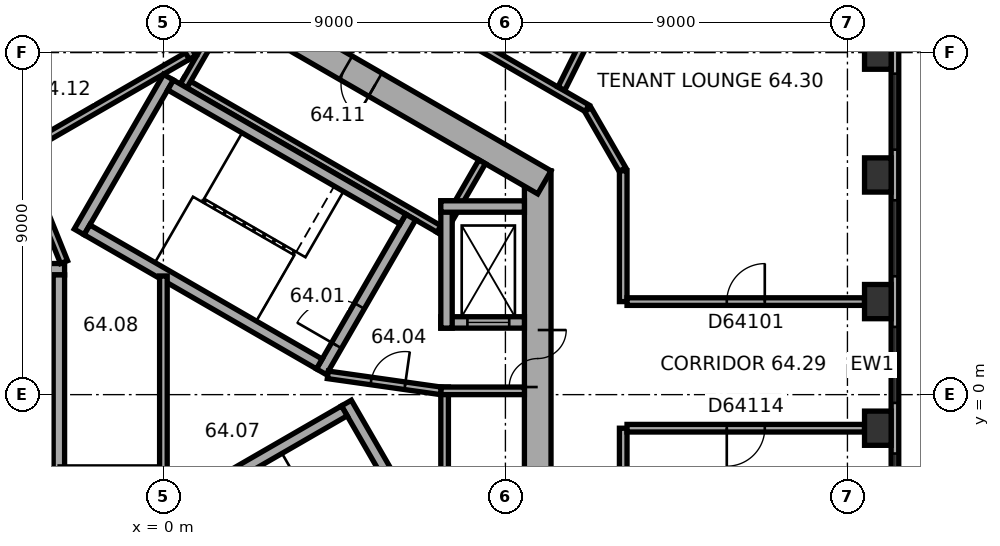
"""IFC4 building model, lengths in metres.
Left out: names, types, materials, properties, quantities, classifications, styles, units other than length and angle.
Written with IfcOpenShell. Run it as: python <this file> out.ifc"""

import sys

from ifc_helpers import new_model, si_unit, direction, frame, frame_2d, origin, origin_2d, place, context, subcontext, project, spatial, rectangle, extrude, element, fill, save


model = new_model("IFC4")
c1 = context("Model", 3, precision=1e-05, world=origin(), true_north=direction((0.0, 1.0)))
c2 = subcontext(c1, "Body", "Model", "MODEL_VIEW")
j1 = project(units=[si_unit("LENGTHUNIT", "METRE"), si_unit("PLANEANGLEUNIT", "RADIAN")], contexts=[c1])
p1 = place(None, origin())
s1 = spatial("IfcSite", under=j1, at=p1, CompositionType="ELEMENT")
p2 = place(p1, origin())
s2 = spatial("IfcBuilding", under=s1, at=p2, CompositionType="ELEMENT")
p3 = place(p2, frame((0.0, 0.0, 259.8)))
s3 = spatial("IfcBuildingStorey", under=s2, at=p3, CompositionType="ELEMENT", Elevation=259.8)
for number, where, z_axis, x_axis in (
    (1, (18.8, -0.883, 0.0), (0.0, 0.0, 1.0), (0.0, 1.0, 0.0)),
    (2, (18.8, 2.448, 0.0), (0.0, 0.0, 1.0), (0.0, 1.0, 0.0)),
    (3, (18.8, 5.78, 0.0), (0.0, 0.0, 1.0), (0.0, 1.0, 0.0)),
):
    element("IfcColumn", number, at=place(p3, frame(where, z_axis=z_axis, x_axis=x_axis)), inside=s3, PredefinedType="COLUMN", context=c2, shape_type="SweptSolid", body=[
        extrude(rectangle(XDim=0.9, YDim=0.7, at=origin_2d()), origin(), (0.0, 0.0, 1.0), 3.7),
    ])
p4 = place(p3, frame((18.8, 9.112, 0.0), z_axis=(0.0, 0.0, 1.0), x_axis=(0.0, 1.0, 0.0)))
e4 = element("IfcColumn", 4, at=p4, inside=s3, PredefinedType="COLUMN", context=c2, shape_type="SweptSolid", body=[
    extrude(rectangle(XDim=1.1, YDim=0.7, at=origin_2d()), origin(), (0.0, 0.0, 1.0), 3.7),
])
p5 = place(p3, frame((9.85, -5.889, 0.0), z_axis=(0.0, 0.0, 1.0), x_axis=(0.0, 1.0, 0.0)))
e5 = element("IfcWall", 5, at=p5, inside=s3, PredefinedType="SHEAR", context=c2, shape_type="SweptSolid", body=[
    extrude(rectangle(XDim=11.778, YDim=0.7, at=frame_2d((5.889, 0.0))), origin(), (0.0, 0.0, 1.0), 3.7),
])
p6 = place(p5, frame((6.089, 0.0, 0.0)))
e6 = element("IfcOpeningElement", 6, at=p6, cuts=e5, PredefinedType="OPENING", context=c2, shape_type="SweptSolid", body=[
    extrude(rectangle(XDim=1.5, YDim=2.1, at=frame_2d((0.75, 1.05))), frame((0.0, 0.36, 0.0), z_axis=(0.0, -1.0, 0.0), x_axis=(1.0, 0.0, 0.0)), (0.0, 0.0, 1.0), 0.72),
])
p7 = place(p5, frame((2.939, 0.0, 0.0)))
e7 = element("IfcOpeningElement", 7, at=p7, cuts=e5, PredefinedType="OPENING", context=c2, shape_type="SweptSolid", body=[
    extrude(rectangle(XDim=0.9, YDim=2.1, at=frame_2d((0.45, 1.05))), frame((0.0, 0.36, 0.0), z_axis=(0.0, -1.0, 0.0), x_axis=(1.0, 0.0, 0.0)), (0.0, 0.0, 1.0), 0.72),
])
p8 = place(p3, frame((10.025, 5.586, 0.0), z_axis=(0.0, 0.0, 1.0), x_axis=(-0.866026453023, 0.499998182661, 0.0)))
e8 = element("IfcWall", 8, at=p8, inside=s3, PredefinedType="SHEAR", context=c2, shape_type="SweptSolid", body=[
    extrude(rectangle(XDim=11.778, YDim=0.7, at=frame_2d((5.889, 0.0))), origin(), (0.0, 0.0, 1.0), 3.7),
])
p9 = place(p8, frame((5.139, 0.0, 0.0)))
e9 = element("IfcOpeningElement", 9, at=p9, cuts=e8, PredefinedType="OPENING", context=c2, shape_type="SweptSolid", body=[
    extrude(rectangle(XDim=0.9, YDim=2.1, at=frame_2d((0.45, 1.05))), frame((0.0, 0.36, 0.0), z_axis=(0.0, -1.0, 0.0), x_axis=(1.0, 0.0, 0.0)), (0.0, 0.0, 1.0), 0.72),
])
p10 = place(p3, frame((0.175, 11.475, 0.0), z_axis=(0.0, 0.0, 1.0), x_axis=(-0.866026453023, -0.499998182661, 0.0)))
e10 = element("IfcWall", 10, at=p10, inside=s3, PredefinedType="SHEAR", context=c2, shape_type="SweptSolid", body=[
    extrude(rectangle(XDim=11.778, YDim=0.7, at=frame_2d((5.889, 0.0))), origin(), (0.0, 0.0, 1.0), 3.7),
])
p11 = place(p10, frame((6.089, 0.0, 0.0)))
e11 = element("IfcOpeningElement", 11, at=p11, cuts=e10, PredefinedType="OPENING", context=c2, shape_type="SweptSolid", body=[
    extrude(rectangle(XDim=1.5, YDim=2.1, at=frame_2d((0.75, 1.05))), frame((0.0, 0.36, 0.0), z_axis=(0.0, -1.0, 0.0), x_axis=(1.0, 0.0, 0.0)), (0.0, 0.0, 1.0), 0.72),
])
p12 = place(p10, frame((2.939, 0.0, 0.0)))
e12 = element("IfcOpeningElement", 12, at=p12, cuts=e10, PredefinedType="OPENING", context=c2, shape_type="SweptSolid", body=[
    extrude(rectangle(XDim=0.9, YDim=2.1, at=frame_2d((0.45, 1.05))), frame((0.0, 0.36, 0.0), z_axis=(0.0, -1.0, 0.0), x_axis=(1.0, 0.0, 0.0)), (0.0, 0.0, 1.0), 0.72),
])
p13 = place(p3, frame((19.25, -8.084, 0.0), z_axis=(0.0, 0.0, 1.0), x_axis=(0.0, 1.0, 0.0)))
e13 = element("IfcWall", 13, at=p13, inside=s3, PredefinedType="STANDARD", context=c2, shape_type="SweptSolid", body=[
    extrude(rectangle(XDim=17.731, YDim=0.2, at=frame_2d((8.866, 0.0))), origin(), (0.0, 0.0, 1.0), 3.7),
])
p14 = place(p13, frame((1.203, 0.0, 0.9)))
e14 = element("IfcOpeningElement", 14, at=p14, cuts=e13, PredefinedType="OPENING", context=c2, shape_type="SweptSolid", body=[
    extrude(rectangle(XDim=2.0, YDim=2.0, at=frame_2d((1.0, 1.0))), frame((0.0, 0.11, 0.0), z_axis=(0.0, -1.0, 0.0), x_axis=(1.0, 0.0, 0.0)), (0.0, 0.0, 1.0), 0.22),
])
p15 = place(p13, frame((4.535, 0.0, 0.9)))
e15 = element("IfcOpeningElement", 15, at=p15, cuts=e13, PredefinedType="OPENING", context=c2, shape_type="SweptSolid", body=[
    extrude(rectangle(XDim=2.0, YDim=2.0, at=frame_2d((1.0, 1.0))), frame((0.0, 0.11, 0.0), z_axis=(0.0, -1.0, 0.0), x_axis=(1.0, 0.0, 0.0)), (0.0, 0.0, 1.0), 0.22),
])
p16 = place(p13, frame((7.866, 0.0, 0.9)))
e16 = element("IfcOpeningElement", 16, at=p16, cuts=e13, PredefinedType="OPENING", context=c2, shape_type="SweptSolid", body=[
    extrude(rectangle(XDim=2.0, YDim=2.0, at=frame_2d((1.0, 1.0))), frame((0.0, 0.11, 0.0), z_axis=(0.0, -1.0, 0.0), x_axis=(1.0, 0.0, 0.0)), (0.0, 0.0, 1.0), 0.22),
])
p17 = place(p13, frame((11.198, 0.0, 0.9)))
e17 = element("IfcOpeningElement", 17, at=p17, cuts=e13, PredefinedType="OPENING", context=c2, shape_type="SweptSolid", body=[
    extrude(rectangle(XDim=2.0, YDim=2.0, at=frame_2d((1.0, 1.0))), frame((0.0, 0.11, 0.0), z_axis=(0.0, -1.0, 0.0), x_axis=(1.0, 0.0, 0.0)), (0.0, 0.0, 1.0), 0.22),
])
p18 = place(p13, frame((14.53, 0.0, 0.9)))
e18 = element("IfcOpeningElement", 18, at=p18, cuts=e13, PredefinedType="OPENING", context=c2, shape_type="SweptSolid", body=[
    extrude(rectangle(XDim=2.0, YDim=2.0, at=frame_2d((1.0, 1.0))), frame((0.0, 0.11, 0.0), z_axis=(0.0, -1.0, 0.0), x_axis=(1.0, 0.0, 0.0)), (0.0, 0.0, 1.0), 0.22),
])
p19 = place(p3, frame((7.4, -5.2, 0.0), z_axis=(0.0, 0.0, 1.0), x_axis=(0.0, 1.0, 0.0)))
e19 = element("IfcWall", 19, at=p19, inside=s3, PredefinedType="PARTITIONING", context=c2, shape_type="SweptSolid", body=[
    extrude(rectangle(XDim=5.4, YDim=0.2, at=frame_2d((2.7, 0.0))), origin(), (0.0, 0.0, 1.0), 3.42),
])
p20 = place(p3, frame((7.3, 0.1, 0.0), z_axis=(0.0, 0.0, 1.0), x_axis=(1.0, 0.0, 0.0)))
e20 = element("IfcWall", 20, at=p20, inside=s3, PredefinedType="PARTITIONING", context=c2, shape_type="SweptSolid", body=[
    extrude(rectangle(XDim=2.2, YDim=0.2, at=frame_2d((1.1, 0.0))), origin(), (0.0, 0.0, 1.0), 3.42),
])
p21 = place(p3, frame((7.424, 4.259, 0.0), z_axis=(0.0, 0.0, 1.0), x_axis=(-0.866026010844, 0.49999894854, 0.0)))
e21 = element("IfcWall", 21, at=p21, inside=s3, PredefinedType="PARTITIONING", context=c2, shape_type="SweptSolid", body=[
    extrude(rectangle(XDim=8.0, YDim=0.2, at=frame_2d((4.0, 0.0))), origin(), (0.0, 0.0, 1.0), 3.42),
])
for number, where, z_axis, x_axis in (
    (22, (7.287, 4.222, 0.0), (0.0, 0.0, 1.0), (0.5, 0.866, 0.0)),
    (23, (0.532, 8.122, 0.0), (0.0, 0.0, 1.0), (0.5, 0.866, 0.0)),
):
    element("IfcWall", number, at=place(p3, frame(where, z_axis=z_axis, x_axis=x_axis)), inside=s3, PredefinedType="PARTITIONING", context=c2, shape_type="SweptSolid", body=[
        extrude(rectangle(XDim=2.2, YDim=0.2, at=frame_2d((1.1, 0.0))), origin(), (0.0, 0.0, 1.0), 3.42),
    ])
p22 = place(p3, frame((0.803, 9.009, 0.0), z_axis=(0.0, 0.0, 1.0), x_axis=(-0.866028230842, -0.499995103361, 0.0)))
e24 = element("IfcWall", 24, at=p22, inside=s3, PredefinedType="PARTITIONING", context=c2, shape_type="SweptSolid", body=[
    extrude(rectangle(XDim=5.4, YDim=0.2, at=frame_2d((2.7, 0.0))), origin(), (0.0, 0.0, 1.0), 3.42),
])
p23 = place(p3, frame((0.767, 8.872, 0.0), z_axis=(0.0, 0.0, 1.0), x_axis=(-0.499994660107, 0.866028486751, 0.0)))
e25 = element("IfcWall", 25, at=p23, inside=s3, PredefinedType="PARTITIONING", context=c2, shape_type="SweptSolid", body=[
    extrude(rectangle(XDim=2.2, YDim=0.2, at=frame_2d((1.1, 0.0))), origin(), (0.0, 0.0, 1.0), 3.42),
])
p24 = place(p3, frame((4.158, 0.602, 0.0), z_axis=(0.0, 0.0, 1.0), x_axis=(0.499977259774, 0.866038532462, 0.0)))
e26 = element("IfcWall", 26, at=p24, inside=s3, PredefinedType="SHEAR", context=c2, shape_type="SweptSolid", body=[
    extrude(rectangle(XDim=4.7, YDim=0.3, at=frame_2d((2.35, 0.0))), origin(), (0.0, 0.0, 1.0), 3.42),
])
p25 = place(p24, frame((0.8, 0.0, 0.0)))
e27 = element("IfcOpeningElement", 27, at=p25, cuts=e26, PredefinedType="OPENING", context=c2, shape_type="SweptSolid", body=[
    extrude(rectangle(XDim=1.2, YDim=2.1, at=frame_2d((0.6, 1.05))), frame((0.0, 0.16, 0.0), z_axis=(0.0, -1.0, 0.0), x_axis=(1.0, 0.0, 0.0)), (0.0, 0.0, 1.0), 0.32),
])
p26 = place(p3, frame((-2.216, 4.282, 0.0), z_axis=(0.0, 0.0, 1.0), x_axis=(0.499977259774, 0.866038532462, 0.0)))
e28 = element("IfcWall", 28, at=p26, inside=s3, PredefinedType="SHEAR", context=c2, shape_type="SweptSolid", body=[
    extrude(rectangle(XDim=4.7, YDim=0.3, at=frame_2d((2.35, 0.0))), origin(), (0.0, 0.0, 1.0), 3.42),
])
for number, where, z_axis, x_axis in (
    (29, (4.103, 0.807, 0.0), (0.0, 0.0, 1.0), (-0.866, 0.5, 0.0)),
    (30, (6.303, 4.617, 0.0), (0.0, 0.0, 1.0), (-0.866, 0.5, 0.0)),
):
    element("IfcWall", number, at=place(p3, frame(where, z_axis=z_axis, x_axis=x_axis)), inside=s3, PredefinedType="SHEAR", context=c2, shape_type="SweptSolid", body=[
        extrude(rectangle(XDim=7.06, YDim=0.3, at=frame_2d((3.53, 0.0))), origin(), (0.0, 0.0, 1.0), 3.42),
    ])
p27 = place(p3, frame((-2.6, 3.3, 0.0), z_axis=(0.0, 0.0, 1.0), x_axis=(-1.0, 0.0, 0.0)))
e31 = element("IfcWall", 31, at=p27, inside=s3, PredefinedType="SHEAR", context=c2, shape_type="SweptSolid", body=[
    extrude(rectangle(XDim=4.7, YDim=0.3, at=frame_2d((2.35, 0.0))), origin(), (0.0, 0.0, 1.0), 3.42),
])
p28 = place(p27, frame((0.8, 0.0, 0.0)))
e32 = element("IfcOpeningElement", 32, at=p28, cuts=e31, PredefinedType="OPENING", context=c2, shape_type="SweptSolid", body=[
    extrude(rectangle(XDim=1.2, YDim=2.1, at=frame_2d((0.6, 1.05))), frame((0.0, 0.16, 0.0), z_axis=(0.0, -1.0, 0.0), x_axis=(1.0, 0.0, 0.0)), (0.0, 0.0, 1.0), 0.32),
])
p29 = place(p3, frame((-2.75, 3.15, 0.0), z_axis=(0.0, 0.0, 1.0), x_axis=(0.0, -1.0, 0.0)))
e33 = element("IfcWall", 33, at=p29, inside=s3, PredefinedType="SHEAR", context=c2, shape_type="SweptSolid", body=[
    extrude(rectangle(XDim=7.06, YDim=0.3, at=frame_2d((3.53, 0.0))), origin(), (0.0, 0.0, 1.0), 3.42),
])
p30 = place(p3, frame((4.816, -0.222, 0.0), z_axis=(0.0, 0.0, 1.0), x_axis=(0.499977259774, -0.866038532462, 0.0)))
e34 = element("IfcWall", 34, at=p30, inside=s3, PredefinedType="SHEAR", context=c2, shape_type="SweptSolid", body=[
    extrude(rectangle(XDim=4.7, YDim=0.3, at=frame_2d((2.35, 0.0))), origin(), (0.0, 0.0, 1.0), 3.42),
])
p31 = place(p3, frame((-1.353, -3.957, 0.0), z_axis=(0.0, 0.0, 1.0), x_axis=(0.866027801685, 0.499995846692, 0.0)))
e35 = element("IfcWall", 35, at=p31, inside=s3, PredefinedType="SHEAR", context=c2, shape_type="SweptSolid", body=[
    extrude(rectangle(XDim=7.06, YDim=0.3, at=frame_2d((3.53, 0.0))), origin(), (0.0, 0.0, 1.0), 3.42),
])
p32 = place(p3, frame((7.3, 1.9, 0.0), z_axis=(0.0, 0.0, 1.0), x_axis=(1.0, 0.0, 0.0)))
e36 = element("IfcWall", 36, at=p32, inside=s3, PredefinedType="SHEAR", context=c2, shape_type="SweptSolid", body=[
    extrude(rectangle(XDim=2.2, YDim=0.3, at=frame_2d((1.1, 0.0))), origin(), (0.0, 0.0, 1.0), 3.42),
])
p33 = place(p32, frame((0.7, 0.0, 0.0)))
e37 = element("IfcOpeningElement", 37, at=p33, cuts=e36, PredefinedType="OPENING", context=c2, shape_type="SweptSolid", body=[
    extrude(rectangle(XDim=1.1, YDim=2.1, at=frame_2d((0.55, 1.05))), frame((0.0, 0.16, 0.0), z_axis=(0.0, -1.0, 0.0), x_axis=(1.0, 0.0, 0.0)), (0.0, 0.0, 1.0), 0.32),
])
p34 = place(p3, frame((7.45, 1.75, 0.0), z_axis=(0.0, 0.0, 1.0), x_axis=(0.0, 1.0, 0.0)))
e38 = element("IfcWall", 38, at=p34, inside=s3, PredefinedType="SHEAR", context=c2, shape_type="SweptSolid", body=[
    extrude(rectangle(XDim=3.35, YDim=0.3, at=frame_2d((1.675, 0.0))), origin(), (0.0, 0.0, 1.0), 3.42),
])
p35 = place(p3, frame((7.3, 4.95, 0.0), z_axis=(0.0, 0.0, 1.0), x_axis=(1.0, 0.0, 0.0)))
e39 = element("IfcWall", 39, at=p35, inside=s3, PredefinedType="SHEAR", context=c2, shape_type="SweptSolid", body=[
    extrude(rectangle(XDim=2.2, YDim=0.3, at=frame_2d((1.1, 0.0))), origin(), (0.0, 0.0, 1.0), 3.42),
])
p36 = place(p3, frame((4.327, 0.521, 0.0), z_axis=(0.0, 0.0, 1.0), x_axis=(0.990124376366, -0.14019172346, 0.0)))
e40 = element("IfcWall", 40, at=p36, inside=s3, PredefinedType="PARTITIONING", context=c2, shape_type="SweptSolid", body=[
    extrude(rectangle(XDim=3.002, YDim=0.2, at=frame_2d((1.501, 0.0))), origin(), (0.0, 0.0, 1.0), 3.42),
])
p37 = place(p36, frame((1.15, 0.0, 0.0)))
e41 = element("IfcOpeningElement", 41, at=p37, cuts=e40, PredefinedType="OPENING", context=c2, shape_type="SweptSolid", body=[
    extrude(rectangle(XDim=0.9, YDim=2.1, at=frame_2d((0.45, 1.05))), frame((0.0, 0.11, 0.0), z_axis=(0.0, -1.0, 0.0), x_axis=(1.0, 0.0, 0.0)), (0.0, 0.0, 1.0), 0.22),
])
p38 = place(p3, frame((-2.615, 3.487, 0.0), z_axis=(0.0, 0.0, 1.0), x_axis=(-0.373576831041, 0.92759924068, 0.0)))
e42 = element("IfcWall", 42, at=p38, inside=s3, PredefinedType="PARTITIONING", context=c2, shape_type="SweptSolid", body=[
    extrude(rectangle(XDim=3.002, YDim=0.2, at=frame_2d((1.501, 0.0))), origin(), (0.0, 0.0, 1.0), 3.42),
])
p39 = place(p38, frame((1.15, 0.0, 0.0)))
e43 = element("IfcOpeningElement", 43, at=p39, cuts=e42, PredefinedType="OPENING", context=c2, shape_type="SweptSolid", body=[
    extrude(rectangle(XDim=0.9, YDim=2.1, at=frame_2d((0.45, 1.05))), frame((0.0, 0.11, 0.0), z_axis=(0.0, -1.0, 0.0), x_axis=(1.0, 0.0, 0.0)), (0.0, 0.0, 1.0), 0.22),
])
p40 = place(p3, frame((0.0, -3.122, 0.0), z_axis=(0.0, 0.0, 1.0), x_axis=(0.0, 1.0, 0.0)))
e44 = element("IfcWall", 44, at=p40, inside=s3, PredefinedType="PARTITIONING", context=c2, shape_type="SweptSolid", body=[
    extrude(rectangle(XDim=6.245, YDim=0.2, at=frame_2d((3.122, 0.0))), origin(), (0.0, 0.0, 1.0), 3.42),
])
p41 = place(p3, frame((11.15, 7.534, 0.0), z_axis=(0.0, 0.0, 1.0), x_axis=(-0.866026603062, 0.499997922785, 0.0)))
e45 = element("IfcWall", 45, at=p41, inside=s3, PredefinedType="PARTITIONING", context=c2, shape_type="SweptSolid", body=[
    extrude(rectangle(XDim=11.738, YDim=0.2, at=frame_2d((5.869, 0.0))), origin(), (0.0, 0.0, 1.0), 3.42),
])
p42 = place(p41, frame((5.345, 0.0, 0.0)))
e46 = element("IfcOpeningElement", 46, at=p42, cuts=e45, PredefinedType="OPENING", context=c2, shape_type="SweptSolid", body=[
    extrude(rectangle(XDim=1.0, YDim=2.1, at=frame_2d((0.5, 1.05))), frame((0.0, 0.11, 0.0), z_axis=(0.0, -1.0, 0.0), x_axis=(1.0, 0.0, 0.0)), (0.0, 0.0, 1.0), 0.22),
])
p43 = place(p3, frame((12.08, 5.924, 0.0), z_axis=(0.0, 0.0, 1.0), x_axis=(-0.500004960326, 0.86602253992, 0.0)))
e47 = element("IfcWall", 47, at=p43, inside=s3, PredefinedType="PARTITIONING", context=c2, shape_type="SweptSolid", body=[
    extrude(rectangle(XDim=1.82, YDim=0.2, at=frame_2d((0.91, 0.0))), origin(), (0.0, 0.0, 1.0), 3.42),
])
p44 = place(p3, frame((12.1, -5.849, 0.0), z_axis=(0.0, 0.0, 1.0), x_axis=(0.0, 1.0, 0.0)))
e48 = element("IfcWall", 48, at=p44, inside=s3, PredefinedType="PARTITIONING", context=c2, shape_type="SweptSolid", body=[
    extrude(rectangle(XDim=4.966, YDim=0.2, at=frame_2d((2.483, 0.0))), origin(), (0.0, 0.0, 1.0), 3.42),
])
p45 = place(p3, frame((12.1, 2.448, 0.0), z_axis=(0.0, 0.0, 1.0), x_axis=(0.0, 1.0, 0.0)))
e49 = element("IfcWall", 49, at=p45, inside=s3, PredefinedType="PARTITIONING", context=c2, shape_type="SweptSolid", body=[
    extrude(rectangle(XDim=3.441, YDim=0.2, at=frame_2d((1.72, 0.0))), origin(), (0.0, 0.0, 1.0), 3.42),
])
p46 = place(p3, frame((12.2, -0.883, 0.0), z_axis=(0.0, 0.0, 1.0), x_axis=(1.0, 0.0, 0.0)))
e50 = element("IfcWall", 50, at=p46, inside=s3, PredefinedType="PARTITIONING", context=c2, shape_type="SweptSolid", body=[
    extrude(rectangle(XDim=6.25, YDim=0.2, at=frame_2d((3.125, 0.0))), origin(), (0.0, 0.0, 1.0), 2.87),
])
p47 = place(p46, frame((2.625, 0.0, 0.0)))
e51 = element("IfcOpeningElement", 51, at=p47, cuts=e50, PredefinedType="OPENING", context=c2, shape_type="SweptSolid", body=[
    extrude(rectangle(XDim=1.0, YDim=2.1, at=frame_2d((0.5, 1.05))), frame((0.0, 0.11, 0.0), z_axis=(0.0, -1.0, 0.0), x_axis=(1.0, 0.0, 0.0)), (0.0, 0.0, 1.0), 0.22),
])
p48 = place(p3, frame((13.405, 13.933, 0.0), z_axis=(0.0, 0.0, 1.0), x_axis=(-0.446187838644, -0.894939334618, 0.0)))
e52 = element("IfcWall", 52, at=p48, inside=s3, PredefinedType="PARTITIONING", context=c2, shape_type="SweptSolid", body=[
    extrude(rectangle(XDim=6.571, YDim=0.2, at=frame_2d((3.286, 0.0))), origin(), (0.0, 0.0, 1.0), 3.42),
])
p49 = place(p3, frame((18.45, 2.448, 0.0), z_axis=(0.0, 0.0, 1.0), x_axis=(-1.0, 0.0, 0.0)))
e53 = element("IfcWall", 53, at=p49, inside=s3, PredefinedType="PARTITIONING", context=c2, shape_type="SweptSolid", body=[
    extrude(rectangle(XDim=6.25, YDim=0.2, at=frame_2d((3.125, 0.0))), origin(), (0.0, 0.0, 1.0), 3.42),
])
p50 = place(p49, frame((2.625, 0.0, 0.0)))
e54 = element("IfcOpeningElement", 54, at=p50, cuts=e53, PredefinedType="OPENING", context=c2, shape_type="SweptSolid", body=[
    extrude(rectangle(XDim=1.0, YDim=2.1, at=frame_2d((0.5, 1.05))), frame((0.0, 0.11, 0.0), z_axis=(0.0, -1.0, 0.0), x_axis=(1.0, 0.0, 0.0)), (0.0, 0.0, 1.0), 0.22),
])
p51 = place(p15, origin())
e55 = element("IfcWindow", 55, at=p51, inside=s3, PartitioningType="SINGLE_PANEL", PredefinedType="WINDOW", context=c2, shape_type="SweptSolid", body=[
    extrude(rectangle(XDim=2.0, YDim=2.0, at=frame_2d((1.0, 1.0))), frame((0.0, 0.03, 0.0), z_axis=(0.0, -1.0, 0.0), x_axis=(1.0, 0.0, 0.0)), (0.0, 0.0, 1.0), 0.06),
])
fill(e15, e55)
p52 = place(p16, origin())
e56 = element("IfcWindow", 56, at=p52, inside=s3, PartitioningType="SINGLE_PANEL", PredefinedType="WINDOW", context=c2, shape_type="SweptSolid", body=[
    extrude(rectangle(XDim=2.0, YDim=2.0, at=frame_2d((1.0, 1.0))), frame((0.0, 0.03, 0.0), z_axis=(0.0, -1.0, 0.0), x_axis=(1.0, 0.0, 0.0)), (0.0, 0.0, 1.0), 0.06),
])
fill(e16, e56)
p53 = place(p17, origin())
e57 = element("IfcWindow", 57, at=p53, inside=s3, PartitioningType="SINGLE_PANEL", PredefinedType="WINDOW", context=c2, shape_type="SweptSolid", body=[
    extrude(rectangle(XDim=2.0, YDim=2.0, at=frame_2d((1.0, 1.0))), frame((0.0, 0.03, 0.0), z_axis=(0.0, -1.0, 0.0), x_axis=(1.0, 0.0, 0.0)), (0.0, 0.0, 1.0), 0.06),
])
fill(e17, e57)
p54 = place(p18, origin())
e58 = element("IfcWindow", 58, at=p54, inside=s3, PartitioningType="SINGLE_PANEL", PredefinedType="WINDOW", context=c2, shape_type="SweptSolid", body=[
    extrude(rectangle(XDim=2.0, YDim=2.0, at=frame_2d((1.0, 1.0))), frame((0.0, 0.03, 0.0), z_axis=(0.0, -1.0, 0.0), x_axis=(1.0, 0.0, 0.0)), (0.0, 0.0, 1.0), 0.06),
])
fill(e18, e58)
p55 = place(p6, origin())
e59 = element("IfcDoor", 59, at=p55, inside=s3, OperationType="DOUBLE_DOOR_SINGLE_SWING", PredefinedType="DOOR", context=c2, shape_type="SweptSolid", body=[
    extrude(rectangle(XDim=1.5, YDim=2.1, at=frame_2d((0.75, 1.05))), frame((0.0, 0.025, 0.0), z_axis=(0.0, -1.0, 0.0), x_axis=(1.0, 0.0, 0.0)), (0.0, 0.0, 1.0), 0.05),
])
fill(e6, e59)
p56 = place(p25, origin())
e60 = element("IfcDoor", 60, at=p56, inside=s3, OperationType="SINGLE_SWING_RIGHT", PredefinedType="DOOR", context=c2, shape_type="SweptSolid", body=[
    extrude(rectangle(XDim=1.2, YDim=2.1, at=frame_2d((0.6, 1.05))), frame((0.0, 0.025, 0.0), z_axis=(0.0, -1.0, 0.0), x_axis=(1.0, 0.0, 0.0)), (0.0, 0.0, 1.0), 0.05),
])
fill(e27, e60)
p57 = place(p37, origin())
e61 = element("IfcDoor", 61, at=p57, inside=s3, OperationType="SINGLE_SWING_LEFT", PredefinedType="DOOR", context=c2, shape_type="SweptSolid", body=[
    extrude(rectangle(XDim=0.9, YDim=2.1, at=frame_2d((0.45, 1.05))), frame((0.0, 0.025, 0.0), z_axis=(0.0, -1.0, 0.0), x_axis=(1.0, 0.0, 0.0)), (0.0, 0.0, 1.0), 0.05),
])
fill(e41, e61)
p58 = place(p9, origin())
e62 = element("IfcDoor", 62, at=p58, inside=s3, OperationType="SINGLE_SWING_LEFT", PredefinedType="DOOR", context=c2, shape_type="SweptSolid", body=[
    extrude(rectangle(XDim=0.9, YDim=2.1, at=frame_2d((0.45, 1.05))), frame((0.0, 0.025, 0.0), z_axis=(0.0, -1.0, 0.0), x_axis=(1.0, 0.0, 0.0)), (0.0, 0.0, 1.0), 0.05),
])
fill(e9, e62)
p59 = place(p33, origin())
e63 = element("IfcDoor", 63, at=p59, inside=s3, OperationType="DOUBLE_DOOR_SLIDING", PredefinedType="DOOR", context=c2, shape_type="SweptSolid", body=[
    extrude(rectangle(XDim=1.1, YDim=2.1, at=frame_2d((0.55, 1.05))), frame((0.0, 0.025, 0.0), z_axis=(0.0, -1.0, 0.0), x_axis=(1.0, 0.0, 0.0)), (0.0, 0.0, 1.0), 0.05),
])
fill(e37, e63)
p60 = place(p50, origin())
e64 = element("IfcDoor", 64, at=p60, inside=s3, OperationType="SINGLE_SWING_LEFT", PredefinedType="DOOR", context=c2, shape_type="SweptSolid", body=[
    extrude(rectangle(XDim=1.0, YDim=2.1, at=frame_2d((0.5, 1.05))), frame((0.0, 0.025, 0.0), z_axis=(0.0, -1.0, 0.0), x_axis=(1.0, 0.0, 0.0)), (0.0, 0.0, 1.0), 0.05),
])
fill(e54, e64)
p61 = place(p47, origin())
e65 = element("IfcDoor", 65, at=p61, inside=s3, OperationType="SINGLE_SWING_LEFT", PredefinedType="DOOR", context=c2, shape_type="SweptSolid", body=[
    extrude(rectangle(XDim=1.0, YDim=2.1, at=frame_2d((0.5, 1.05))), frame((0.0, 0.025, 0.0), z_axis=(0.0, -1.0, 0.0), x_axis=(1.0, 0.0, 0.0)), (0.0, 0.0, 1.0), 0.05),
])
fill(e51, e65)
save(model, sys.argv[1])
